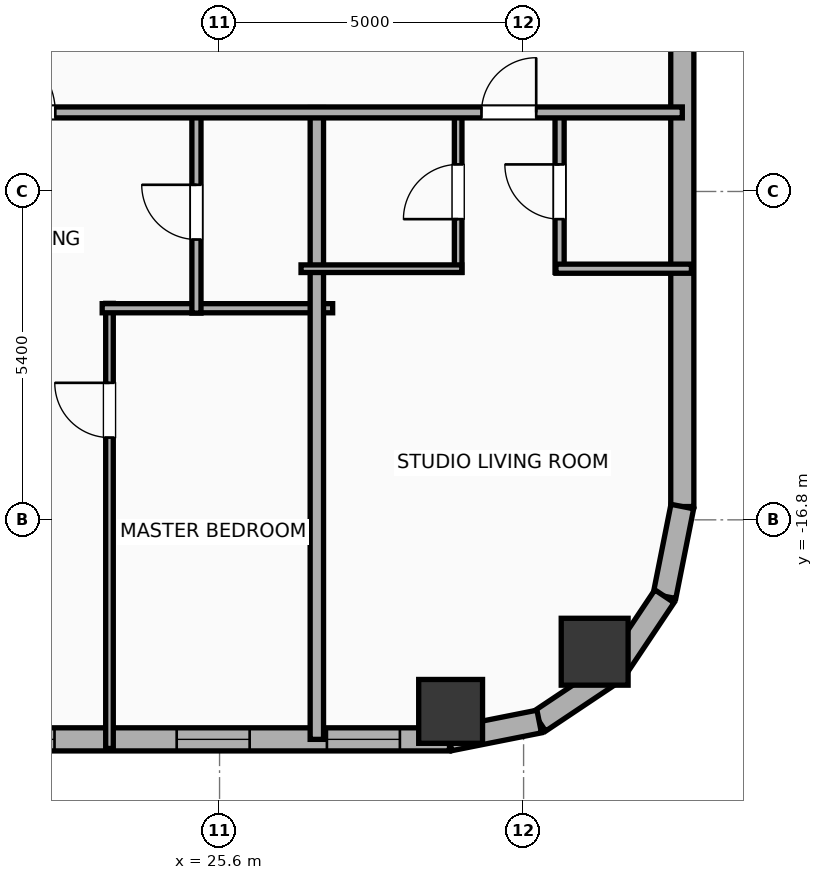
"""IFC4 building model, lengths in metres.
Left out: names, types, materials, properties, quantities, classifications, styles, units other than length and angle.
Written with IfcOpenShell. Run it as: python <this file> out.ifc"""

import sys

from ifc_helpers import new_model, si_unit, direction, frame, frame_2d, origin, origin_2d, place, context, subcontext, project, spatial, rectangle, hollow_rectangle, hollow_circle, extrude, element, fill, save


model = new_model("IFC4")
c1 = context("Model", 3, precision=1e-05, world=origin(), true_north=direction((0.0, 1.0)))
c2 = subcontext(c1, "Body", "Model", "MODEL_VIEW")
j1 = project(units=[si_unit("LENGTHUNIT", "METRE"), si_unit("PLANEANGLEUNIT", "RADIAN")], contexts=[c1])
p1 = place(None, origin())
s1 = spatial("IfcSite", under=j1, at=p1, CompositionType="ELEMENT")
p2 = place(p1, origin())
s2 = spatial("IfcBuilding", under=s1, at=p2, CompositionType="ELEMENT")
p3 = place(p2, frame((0.0, 0.0, 101.4)))
s3 = spatial("IfcBuildingStorey", under=s2, at=p3, CompositionType="ELEMENT", Elevation=101.4)
p4 = place(p3, frame((29.4, -19.95, 0.0), z_axis=(0.0, 0.0, 1.0), x_axis=(1.0, 0.0, 0.0)))
e1 = element("IfcColumn", 1, at=p4, inside=s3, PredefinedType="COLUMN", context=c2, shape_type="SweptSolid", body=[
    extrude(hollow_rectangle(XDim=1.05, YDim=1.05, WallThickness=0.036, at=origin_2d()), origin(), (0.0, 0.0, 1.0), 3.9),
])
p5 = place(p3, frame((31.769, -18.969, 0.0), z_axis=(0.0, 0.0, 1.0), x_axis=(1.0, 0.0, 0.0)))
e2 = element("IfcColumn", 2, at=p5, inside=s3, PredefinedType="COLUMN", context=c2, shape_type="SweptSolid", body=[
    extrude(hollow_circle(Radius=0.55, WallThickness=0.036, at=origin_2d()), origin(), (0.0, 0.0, 1.0), 3.9),
])
p6 = place(p3, frame((29.381, -20.41, 0.0), z_axis=(0.0, 0.0, 1.0), x_axis=(-1.0, 0.0, 0.0)))
e3 = element("IfcWall", 3, at=p6, inside=s3, PredefinedType="ELEMENTEDWALL", context=c2, shape_type="SweptSolid", body=[
    extrude(rectangle(XDim=54.763, YDim=0.38, at=frame_2d((27.381, 0.0))), origin(), (0.0, 0.0, 1.0), 3.65),
])
p7 = place(p6, frame((6.495, 0.0, 0.75)))
e4 = element("IfcOpeningElement", 4, at=p7, cuts=e3, PredefinedType="OPENING", context=c2, shape_type="SweptSolid", body=[
    extrude(rectangle(XDim=2.4, YDim=2.1, at=frame_2d((1.2, 1.05))), frame((0.0, 0.2, 0.0), z_axis=(0.0, -1.0, 0.0), x_axis=(1.0, 0.0, 0.0)), (0.0, 0.0, 1.0), 0.4),
])
p8 = place(p6, frame((17.686, 0.0, 0.75)))
e5 = element("IfcOpeningElement", 5, at=p8, cuts=e3, PredefinedType="OPENING", context=c2, shape_type="SweptSolid", body=[
    extrude(rectangle(XDim=2.4, YDim=2.1, at=frame_2d((1.2, 1.05))), frame((0.0, 0.2, 0.0), z_axis=(0.0, -1.0, 0.0), x_axis=(1.0, 0.0, 0.0)), (0.0, 0.0, 1.0), 0.4),
])
p9 = place(p6, frame((34.677, 0.0, 0.75)))
e6 = element("IfcOpeningElement", 6, at=p9, cuts=e3, PredefinedType="OPENING", context=c2, shape_type="SweptSolid", body=[
    extrude(rectangle(XDim=2.4, YDim=2.1, at=frame_2d((1.2, 1.05))), frame((0.0, 0.2, 0.0), z_axis=(0.0, -1.0, 0.0), x_axis=(1.0, 0.0, 0.0)), (0.0, 0.0, 1.0), 0.4),
])
p10 = place(p6, frame((45.867, 0.0, 0.75)))
e7 = element("IfcOpeningElement", 7, at=p10, cuts=e3, PredefinedType="OPENING", context=c2, shape_type="SweptSolid", body=[
    extrude(rectangle(XDim=2.4, YDim=2.1, at=frame_2d((1.2, 1.05))), frame((0.0, 0.2, 0.0), z_axis=(0.0, -1.0, 0.0), x_axis=(1.0, 0.0, 0.0)), (0.0, 0.0, 1.0), 0.4),
])
p11 = place(p6, frame((52.281, 0.0, 0.75)))
e8 = element("IfcOpeningElement", 8, at=p11, cuts=e3, PredefinedType="OPENING", context=c2, shape_type="SweptSolid", body=[
    extrude(rectangle(XDim=1.2, YDim=2.05, at=frame_2d((0.6, 1.025))), frame((0.0, 0.2, 0.0), z_axis=(0.0, -1.0, 0.0), x_axis=(1.0, 0.0, 0.0)), (0.0, 0.0, 1.0), 0.4),
])
p12 = place(p6, frame((49.641, 0.0, 0.75)))
e9 = element("IfcOpeningElement", 9, at=p12, cuts=e3, PredefinedType="OPENING", context=c2, shape_type="SweptSolid", body=[
    extrude(rectangle(XDim=1.2, YDim=2.05, at=frame_2d((0.6, 1.025))), frame((0.0, 0.2, 0.0), z_axis=(0.0, -1.0, 0.0), x_axis=(1.0, 0.0, 0.0)), (0.0, 0.0, 1.0), 0.4),
])
p13 = place(p6, frame((39.543, 0.0, 0.75)))
e10 = element("IfcOpeningElement", 10, at=p13, cuts=e3, PredefinedType="OPENING", context=c2, shape_type="SweptSolid", body=[
    extrude(rectangle(XDim=1.2, YDim=2.05, at=frame_2d((0.6, 1.025))), frame((0.0, 0.2, 0.0), z_axis=(0.0, -1.0, 0.0), x_axis=(1.0, 0.0, 0.0)), (0.0, 0.0, 1.0), 0.4),
])
p14 = place(p6, frame((44.538, 0.0, 0.75)))
e11 = element("IfcOpeningElement", 11, at=p14, cuts=e3, PredefinedType="OPENING", context=c2, shape_type="SweptSolid", body=[
    extrude(rectangle(XDim=0.52, YDim=2.05, at=frame_2d((0.26, 1.025))), frame((0.0, 0.2, 0.0), z_axis=(0.0, -1.0, 0.0), x_axis=(1.0, 0.0, 0.0)), (0.0, 0.0, 1.0), 0.4),
])
p15 = place(p6, frame((28.206, 0.0, 0.75)))
e12 = element("IfcOpeningElement", 12, at=p15, cuts=e3, PredefinedType="OPENING", context=c2, shape_type="SweptSolid", body=[
    extrude(rectangle(XDim=1.2, YDim=2.05, at=frame_2d((0.6, 1.025))), frame((0.0, 0.2, 0.0), z_axis=(0.0, -1.0, 0.0), x_axis=(1.0, 0.0, 0.0)), (0.0, 0.0, 1.0), 0.4),
])
p16 = place(p6, frame((31.241, 0.0, 0.75)))
e13 = element("IfcOpeningElement", 13, at=p16, cuts=e3, PredefinedType="OPENING", context=c2, shape_type="SweptSolid", body=[
    extrude(rectangle(XDim=0.85, YDim=2.05, at=frame_2d((0.425, 1.025))), frame((0.0, 0.2, 0.0), z_axis=(0.0, -1.0, 0.0), x_axis=(1.0, 0.0, 0.0)), (0.0, 0.0, 1.0), 0.4),
])
p17 = place(p6, frame((24.561, 0.0, 0.75)))
e14 = element("IfcOpeningElement", 14, at=p17, cuts=e3, PredefinedType="OPENING", context=c2, shape_type="SweptSolid", body=[
    extrude(rectangle(XDim=1.2, YDim=2.05, at=frame_2d((0.6, 1.025))), frame((0.0, 0.2, 0.0), z_axis=(0.0, -1.0, 0.0), x_axis=(1.0, 0.0, 0.0)), (0.0, 0.0, 1.0), 0.4),
])
p18 = place(p6, frame((22.561, 0.0, 0.75)))
e15 = element("IfcOpeningElement", 15, at=p18, cuts=e3, PredefinedType="OPENING", context=c2, shape_type="SweptSolid", body=[
    extrude(rectangle(XDim=0.52, YDim=2.05, at=frame_2d((0.26, 1.025))), frame((0.0, 0.2, 0.0), z_axis=(0.0, -1.0, 0.0), x_axis=(1.0, 0.0, 0.0)), (0.0, 0.0, 1.0), 0.4),
])
p19 = place(p6, frame((13.886, 0.0, 0.75)))
e16 = element("IfcOpeningElement", 16, at=p19, cuts=e3, PredefinedType="OPENING", context=c2, shape_type="SweptSolid", body=[
    extrude(rectangle(XDim=1.2, YDim=2.05, at=frame_2d((0.6, 1.025))), frame((0.0, 0.2, 0.0), z_axis=(0.0, -1.0, 0.0), x_axis=(1.0, 0.0, 0.0)), (0.0, 0.0, 1.0), 0.4),
])
p20 = place(p6, frame((11.694, 0.0, 0.75)))
e17 = element("IfcOpeningElement", 17, at=p20, cuts=e3, PredefinedType="OPENING", context=c2, shape_type="SweptSolid", body=[
    extrude(rectangle(XDim=0.85, YDim=2.05, at=frame_2d((0.425, 1.025))), frame((0.0, 0.2, 0.0), z_axis=(0.0, -1.0, 0.0), x_axis=(1.0, 0.0, 0.0)), (0.0, 0.0, 1.0), 0.4),
])
p21 = place(p6, frame((3.286, 0.0, 0.75)))
e18 = element("IfcOpeningElement", 18, at=p21, cuts=e3, PredefinedType="OPENING", context=c2, shape_type="SweptSolid", body=[
    extrude(rectangle(XDim=1.2, YDim=2.05, at=frame_2d((0.6, 1.025))), frame((0.0, 0.2, 0.0), z_axis=(0.0, -1.0, 0.0), x_axis=(1.0, 0.0, 0.0)), (0.0, 0.0, 1.0), 0.4),
])
p22 = place(p6, frame((0.816, 0.0, 0.75)))
e19 = element("IfcOpeningElement", 19, at=p22, cuts=e3, PredefinedType="OPENING", context=c2, shape_type="SweptSolid", body=[
    extrude(rectangle(XDim=1.2, YDim=2.05, at=frame_2d((0.6, 1.025))), frame((0.0, 0.2, 0.0), z_axis=(0.0, -1.0, 0.0), x_axis=(1.0, 0.0, 0.0)), (0.0, 0.0, 1.0), 0.4),
])
p23 = place(p3, frame((33.21, 17.781, 0.0), z_axis=(0.0, 0.0, 1.0), x_axis=(0.0, -1.0, 0.0)))
e20 = element("IfcWall", 20, at=p23, inside=s3, PredefinedType="ELEMENTEDWALL", context=c2, shape_type="SweptSolid", body=[
    extrude(rectangle(XDim=34.363, YDim=0.38, at=frame_2d((17.181, 0.0))), origin(), (0.0, 0.0, 1.0), 3.65),
])
p24 = place(p23, frame((12.836, 0.0, 0.75)))
e21 = element("IfcOpeningElement", 21, at=p24, cuts=e20, PredefinedType="OPENING", context=c2, shape_type="SweptSolid", body=[
    extrude(rectangle(XDim=1.2, YDim=2.05, at=frame_2d((0.6, 1.025))), frame((0.0, 0.2, 0.0), z_axis=(0.0, -1.0, 0.0), x_axis=(1.0, 0.0, 0.0)), (0.0, 0.0, 1.0), 0.4),
])
p25 = place(p23, frame((21.386, 0.0, 0.75)))
e22 = element("IfcOpeningElement", 22, at=p25, cuts=e20, PredefinedType="OPENING", context=c2, shape_type="SweptSolid", body=[
    extrude(rectangle(XDim=1.2, YDim=2.05, at=frame_2d((0.6, 1.025))), frame((0.0, 0.2, 0.0), z_axis=(0.0, -1.0, 0.0), x_axis=(1.0, 0.0, 0.0)), (0.0, 0.0, 1.0), 0.4),
])
p26 = place(p3, frame((33.21, -16.581, 0.0), z_axis=(0.0, 0.0, 1.0), x_axis=(-0.195086038585, -0.980786132421, 0.0)))
e23 = element("IfcWall", 23, at=p26, inside=s3, PredefinedType="ELEMENTEDWALL", context=c2, shape_type="SweptSolid", body=[
    extrude(rectangle(XDim=1.504, YDim=0.38, at=frame_2d((0.752, 0.0))), origin(), (0.0, 0.0, 1.0), 3.65),
])
p27 = place(p3, frame((32.917, -18.057, 0.0), z_axis=(0.0, 0.0, 1.0), x_axis=(-0.555610286119, -0.831442848281, 0.0)))
e24 = element("IfcWall", 24, at=p27, inside=s3, PredefinedType="ELEMENTEDWALL", context=c2, shape_type="SweptSolid", body=[
    extrude(rectangle(XDim=1.485, YDim=0.38, at=frame_2d((0.743, 0.0))), origin(), (0.0, 0.0, 1.0), 3.65),
])
p28 = place(p3, frame((32.091, -19.292, 0.0), z_axis=(0.0, 0.0, 1.0), x_axis=(-0.831468045563, -0.555572577804, 0.0)))
e25 = element("IfcWall", 25, at=p28, inside=s3, PredefinedType="ELEMENTEDWALL", context=c2, shape_type="SweptSolid", body=[
    extrude(rectangle(XDim=1.485, YDim=0.38, at=frame_2d((0.742, 0.0))), origin(), (0.0, 0.0, 1.0), 3.65),
])
p29 = place(p3, frame((30.857, -20.116, 0.0), z_axis=(0.0, 0.0, 1.0), x_axis=(-0.980786132421, -0.195086038585, 0.0)))
e26 = element("IfcWall", 26, at=p29, inside=s3, PredefinedType="ELEMENTEDWALL", context=c2, shape_type="SweptSolid", body=[
    extrude(rectangle(XDim=1.504, YDim=0.38, at=frame_2d((0.752, 0.0))), origin(), (0.0, 0.0, 1.0), 3.65),
])
p30 = place(p3, frame((23.79, -20.56, 0.0), z_axis=(0.0, 0.0, 1.0), x_axis=(0.0, 1.0, 0.0)))
e27 = element("IfcWall", 27, at=p30, inside=s3, PredefinedType="PARTITIONING", context=c2, shape_type="SweptSolid", body=[
    extrude(rectangle(XDim=7.32, YDim=0.125, at=frame_2d((3.66, 0.0))), origin(), (0.0, 0.0, 1.0), 3.65),
])
p31 = place(p30, frame((5.113, 0.0, 0.0)))
e28 = element("IfcOpeningElement", 28, at=p31, cuts=e27, PredefinedType="OPENING", context=c2, shape_type="SweptSolid", body=[
    extrude(rectangle(XDim=0.9, YDim=2.05, at=frame_2d((0.45, 1.025))), frame((0.0, 0.073, 0.0), z_axis=(0.0, -1.0, 0.0), x_axis=(1.0, 0.0, 0.0)), (0.0, 0.0, 1.0), 0.145),
])
p32 = place(p3, frame((23.67, -13.32, 0.0), z_axis=(0.0, 0.0, 1.0), x_axis=(1.0, 0.0, 0.0)))
e29 = element("IfcWall", 29, at=p32, inside=s3, PredefinedType="PLUMBINGWALL", context=c2, shape_type="SweptSolid", body=[
    extrude(rectangle(XDim=3.79, YDim=0.15, at=frame_2d((1.895, 0.0))), origin(), (0.0, 0.0, 1.0), 3.65),
])
p33 = place(p3, frame((25.22, -13.4, 0.0), z_axis=(0.0, 0.0, 1.0), x_axis=(0.0, 1.0, 0.0)))
e30 = element("IfcWall", 30, at=p33, inside=s3, PredefinedType="PLUMBINGWALL", context=c2, shape_type="SweptSolid", body=[
    extrude(rectangle(XDim=3.32, YDim=0.15, at=frame_2d((1.66, 0.0))), origin(), (0.0, 0.0, 1.0), 3.65),
])
p34 = place(p33, frame((1.21, 0.0, 0.0)))
e31 = element("IfcOpeningElement", 31, at=p34, cuts=e30, PredefinedType="OPENING", context=c2, shape_type="SweptSolid", body=[
    extrude(rectangle(XDim=0.9, YDim=2.05, at=frame_2d((0.45, 1.025))), frame((0.0, 0.085, 0.0), z_axis=(0.0, -1.0, 0.0), x_axis=(1.0, 0.0, 0.0)), (0.0, 0.0, 1.0), 0.17),
])
p35 = place(p3, frame((27.2, -20.41, 0.0), z_axis=(0.0, 0.0, 1.0), x_axis=(0.0, 1.0, 0.0)))
e32 = element("IfcWall", 32, at=p35, inside=s3, PredefinedType="PARTITIONING", context=c2, shape_type="SweptSolid", body=[
    extrude(rectangle(XDim=10.39, YDim=0.22, at=frame_2d((5.195, 0.0))), origin(), (0.0, 0.0, 1.0), 3.65),
])
p36 = place(p3, frame((29.524, -12.73, 0.0), z_axis=(0.0, 0.0, 1.0), x_axis=(0.0, 1.0, 0.0)))
e33 = element("IfcWall", 33, at=p36, inside=s3, PredefinedType="PARTITIONING", context=c2, shape_type="SweptSolid", body=[
    extrude(rectangle(XDim=2.65, YDim=0.125, at=frame_2d((1.325, 0.0))), origin(), (0.0, 0.0, 1.0), 3.65),
])
p37 = place(p36, frame((0.875, 0.0, 0.0)))
e34 = element("IfcOpeningElement", 34, at=p37, cuts=e33, PredefinedType="OPENING", context=c2, shape_type="SweptSolid", body=[
    extrude(rectangle(XDim=0.9, YDim=2.05, at=frame_2d((0.45, 1.025))), frame((0.0, 0.073, 0.0), z_axis=(0.0, -1.0, 0.0), x_axis=(1.0, 0.0, 0.0)), (0.0, 0.0, 1.0), 0.145),
])
p38 = place(p3, frame((31.192, -12.73, 0.0), z_axis=(0.0, 0.0, 1.0), x_axis=(0.0, 1.0, 0.0)))
e35 = element("IfcWall", 35, at=p38, inside=s3, PredefinedType="PLUMBINGWALL", context=c2, shape_type="SweptSolid", body=[
    extrude(rectangle(XDim=2.65, YDim=0.15, at=frame_2d((1.325, 0.0))), origin(), (0.0, 0.0, 1.0), 3.65),
])
p39 = place(p38, frame((0.875, 0.0, 0.0)))
e36 = element("IfcOpeningElement", 36, at=p39, cuts=e35, PredefinedType="OPENING", context=c2, shape_type="SweptSolid", body=[
    extrude(rectangle(XDim=0.9, YDim=2.05, at=frame_2d((0.45, 1.025))), frame((0.0, 0.085, 0.0), z_axis=(0.0, -1.0, 0.0), x_axis=(1.0, 0.0, 0.0)), (0.0, 0.0, 1.0), 0.17),
])
p40 = place(p3, frame((26.94, -12.67, 0.0), z_axis=(0.0, 0.0, 1.0), x_axis=(1.0, 0.0, 0.0)))
e37 = element("IfcWall", 37, at=p40, inside=s3, PredefinedType="PARTITIONING", context=c2, shape_type="SweptSolid", body=[
    extrude(rectangle(XDim=2.644, YDim=0.125, at=frame_2d((1.322, 0.0))), origin(), (0.0, 0.0, 1.0), 3.65),
])
p41 = place(p3, frame((31.132, -12.67, 0.0), z_axis=(0.0, 0.0, 1.0), x_axis=(1.0, 0.0, 0.0)))
e38 = element("IfcWall", 38, at=p41, inside=s3, PredefinedType="PLUMBINGWALL", context=c2, shape_type="SweptSolid", body=[
    extrude(rectangle(XDim=2.228, YDim=0.15, at=frame_2d((1.114, 0.0))), origin(), (0.0, 0.0, 1.0), 3.65),
])
p42 = place(p3, frame((-29.21, -10.1, 0.0), z_axis=(0.0, 0.0, 1.0), x_axis=(1.0, 0.0, 0.0)))
e39 = element("IfcWall", 39, at=p42, inside=s3, PredefinedType="PARTITIONING", context=c2, shape_type="SweptSolid", body=[
    extrude(rectangle(XDim=62.42, YDim=0.18, at=frame_2d((31.21, 0.0))), origin(), (0.0, 0.0, 1.0), 3.65),
])
p43 = place(p42, frame((3.033, 0.0, 0.0)))
e40 = element("IfcOpeningElement", 40, at=p43, cuts=e39, PredefinedType="OPENING", context=c2, shape_type="SweptSolid", body=[
    extrude(rectangle(XDim=0.9, YDim=2.05, at=frame_2d((0.45, 1.025))), frame((0.0, 0.1, 0.0), z_axis=(0.0, -1.0, 0.0), x_axis=(1.0, 0.0, 0.0)), (0.0, 0.0, 1.0), 0.2),
])
p44 = place(p42, frame((9.768, 0.0, 0.0)))
e41 = element("IfcOpeningElement", 41, at=p44, cuts=e39, PredefinedType="OPENING", context=c2, shape_type="SweptSolid", body=[
    extrude(rectangle(XDim=0.9, YDim=2.05, at=frame_2d((0.45, 1.025))), frame((0.0, 0.1, 0.0), z_axis=(0.0, -1.0, 0.0), x_axis=(1.0, 0.0, 0.0)), (0.0, 0.0, 1.0), 0.2),
])
p45 = place(p42, frame((18.65, 0.0, 0.0)))
e42 = element("IfcOpeningElement", 42, at=p45, cuts=e39, PredefinedType="OPENING", context=c2, shape_type="SweptSolid", body=[
    extrude(rectangle(XDim=1.15, YDim=2.05, at=frame_2d((0.575, 1.025))), frame((0.0, 0.1, 0.0), z_axis=(0.0, -1.0, 0.0), x_axis=(1.0, 0.0, 0.0)), (0.0, 0.0, 1.0), 0.2),
])
p46 = place(p42, frame((29.212, 0.0, 0.0)))
e43 = element("IfcOpeningElement", 43, at=p46, cuts=e39, PredefinedType="OPENING", context=c2, shape_type="SweptSolid", body=[
    extrude(rectangle(XDim=1.15, YDim=2.05, at=frame_2d((0.575, 1.025))), frame((0.0, 0.1, 0.0), z_axis=(0.0, -1.0, 0.0), x_axis=(1.0, 0.0, 0.0)), (0.0, 0.0, 1.0), 0.2),
])
p47 = place(p42, frame((40.379, 0.0, 0.0)))
e44 = element("IfcOpeningElement", 44, at=p47, cuts=e39, PredefinedType="OPENING", context=c2, shape_type="SweptSolid", body=[
    extrude(rectangle(XDim=1.15, YDim=2.05, at=frame_2d((0.575, 1.025))), frame((0.0, 0.1, 0.0), z_axis=(0.0, -1.0, 0.0), x_axis=(1.0, 0.0, 0.0)), (0.0, 0.0, 1.0), 0.2),
])
p48 = place(p42, frame((50.959, 0.0, 0.0)))
e45 = element("IfcOpeningElement", 45, at=p48, cuts=e39, PredefinedType="OPENING", context=c2, shape_type="SweptSolid", body=[
    extrude(rectangle(XDim=1.15, YDim=2.05, at=frame_2d((0.575, 1.025))), frame((0.0, 0.1, 0.0), z_axis=(0.0, -1.0, 0.0), x_axis=(1.0, 0.0, 0.0)), (0.0, 0.0, 1.0), 0.2),
])
p49 = place(p42, frame((59.117, 0.0, 0.0)))
e46 = element("IfcOpeningElement", 46, at=p49, cuts=e39, PredefinedType="OPENING", context=c2, shape_type="SweptSolid", body=[
    extrude(rectangle(XDim=0.9, YDim=2.05, at=frame_2d((0.45, 1.025))), frame((0.0, 0.1, 0.0), z_axis=(0.0, -1.0, 0.0), x_axis=(1.0, 0.0, 0.0)), (0.0, 0.0, 1.0), 0.2),
])
p50 = place(p7, origin())
e47 = element("IfcWindow", 47, at=p50, inside=s3, PartitioningType="SINGLE_PANEL", PredefinedType="WINDOW", context=c2, shape_type="SweptSolid", body=[
    extrude(rectangle(XDim=2.4, YDim=2.1, at=frame_2d((1.2, 1.05))), frame((0.0, 0.03, 0.0), z_axis=(0.0, -1.0, 0.0), x_axis=(1.0, 0.0, 0.0)), (0.0, 0.0, 1.0), 0.06),
])
fill(e4, e47)
p51 = place(p21, origin())
e48 = element("IfcWindow", 48, at=p51, inside=s3, PartitioningType="SINGLE_PANEL", PredefinedType="WINDOW", context=c2, shape_type="SweptSolid", body=[
    extrude(rectangle(XDim=1.2, YDim=2.05, at=frame_2d((0.6, 1.025))), frame((0.0, 0.03, 0.0), z_axis=(0.0, -1.0, 0.0), x_axis=(1.0, 0.0, 0.0)), (0.0, 0.0, 1.0), 0.06),
])
fill(e18, e48)
p52 = place(p22, origin())
e49 = element("IfcWindow", 49, at=p52, inside=s3, PartitioningType="SINGLE_PANEL", PredefinedType="WINDOW", context=c2, shape_type="SweptSolid", body=[
    extrude(rectangle(XDim=1.2, YDim=2.05, at=frame_2d((0.6, 1.025))), frame((0.0, 0.03, 0.0), z_axis=(0.0, -1.0, 0.0), x_axis=(1.0, 0.0, 0.0)), (0.0, 0.0, 1.0), 0.06),
])
fill(e19, e49)
p53 = place(p31, origin())
e50 = element("IfcDoor", 50, at=p53, inside=s3, OperationType="SINGLE_SWING_RIGHT", PredefinedType="DOOR", context=c2, shape_type="SweptSolid", body=[
    extrude(rectangle(XDim=0.9, YDim=2.05, at=frame_2d((0.45, 1.025))), frame((0.0, 0.025, 0.0), z_axis=(0.0, -1.0, 0.0), x_axis=(1.0, 0.0, 0.0)), (0.0, 0.0, 1.0), 0.05),
])
fill(e28, e50)
p54 = place(p34, origin())
e51 = element("IfcDoor", 51, at=p54, inside=s3, OperationType="SINGLE_SWING_RIGHT", PredefinedType="DOOR", context=c2, shape_type="SweptSolid", body=[
    extrude(rectangle(XDim=0.9, YDim=2.05, at=frame_2d((0.45, 1.025))), frame((0.0, 0.025, 0.0), z_axis=(0.0, -1.0, 0.0), x_axis=(1.0, 0.0, 0.0)), (0.0, 0.0, 1.0), 0.05),
])
fill(e31, e51)
p55 = place(p37, origin())
e52 = element("IfcDoor", 52, at=p55, inside=s3, OperationType="SINGLE_SWING_LEFT", PredefinedType="DOOR", context=c2, shape_type="SweptSolid", body=[
    extrude(rectangle(XDim=0.9, YDim=2.05, at=frame_2d((0.45, 1.025))), frame((0.0, 0.025, 0.0), z_axis=(0.0, -1.0, 0.0), x_axis=(1.0, 0.0, 0.0)), (0.0, 0.0, 1.0), 0.05),
])
fill(e34, e52)
p56 = place(p39, origin())
e53 = element("IfcDoor", 53, at=p56, inside=s3, OperationType="SINGLE_SWING_RIGHT", PredefinedType="DOOR", context=c2, shape_type="SweptSolid", body=[
    extrude(rectangle(XDim=0.9, YDim=2.05, at=frame_2d((0.45, 1.025))), frame((0.0, 0.025, 0.0), z_axis=(0.0, -1.0, 0.0), x_axis=(1.0, 0.0, 0.0)), (0.0, 0.0, 1.0), 0.05),
])
fill(e36, e53)
p57 = place(p48, origin())
e54 = element("IfcDoor", 54, at=p57, inside=s3, OperationType="SINGLE_SWING_LEFT", PredefinedType="DOOR", context=c2, shape_type="SweptSolid", body=[
    extrude(rectangle(XDim=1.15, YDim=2.05, at=frame_2d((0.575, 1.025))), frame((0.0, 0.025, 0.0), z_axis=(0.0, -1.0, 0.0), x_axis=(1.0, 0.0, 0.0)), (0.0, 0.0, 1.0), 0.05),
])
fill(e45, e54)
p58 = place(p49, origin())
e55 = element("IfcDoor", 55, at=p58, inside=s3, OperationType="SINGLE_SWING_RIGHT", PredefinedType="DOOR", context=c2, shape_type="SweptSolid", body=[
    extrude(rectangle(XDim=0.9, YDim=2.05, at=frame_2d((0.45, 1.025))), frame((0.0, 0.025, 0.0), z_axis=(0.0, -1.0, 0.0), x_axis=(1.0, 0.0, 0.0)), (0.0, 0.0, 1.0), 0.05),
])
fill(e46, e55)
save(model, sys.argv[1])
